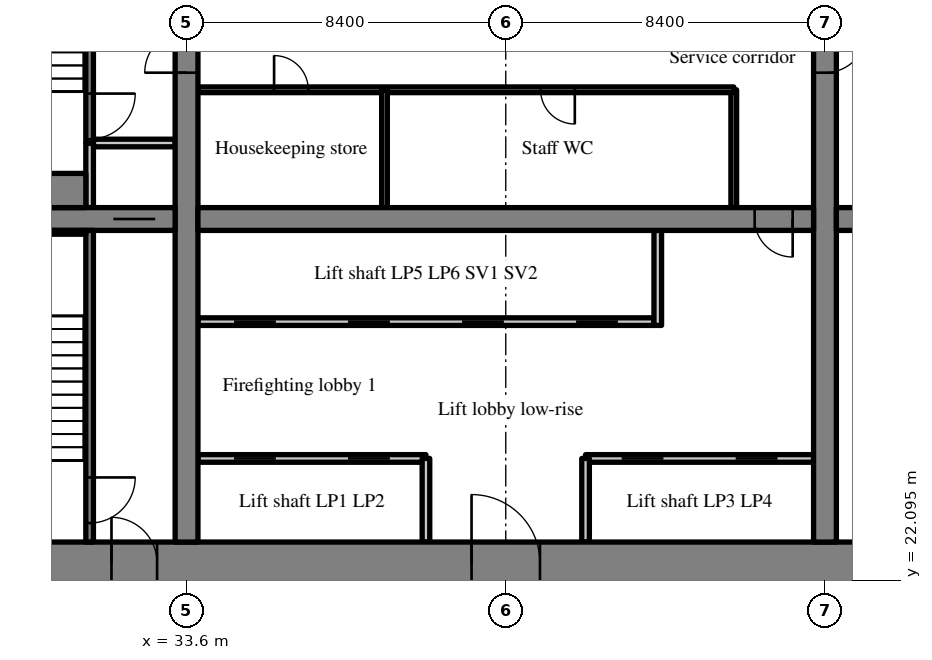
"""IFC4 building model, lengths in metres.
Left out: names, types, materials, properties, quantities, classifications, styles, units other than length and angle.
Written with IfcOpenShell. Run it as: python <this file> out.ifc"""

import sys

from ifc_helpers import new_model, si_unit, direction, frame, frame_2d, origin, place, context, subcontext, project, spatial, rectangle, extrude, source, transform, mapped, element, fill, save


model = new_model("IFC4")
c1 = context("Model", 3, precision=1e-05, world=origin(), true_north=direction((0.0, 1.0)))
c2 = subcontext(c1, "Body", "Model", "MODEL_VIEW")
j1 = project(units=[si_unit("LENGTHUNIT", "METRE"), si_unit("PLANEANGLEUNIT", "RADIAN")], contexts=[c1])
p1 = place(None, origin())
s1 = spatial("IfcSite", under=j1, at=p1, CompositionType="ELEMENT")
p2 = place(p1, origin())
s2 = spatial("IfcBuilding", under=s1, at=p2, CompositionType="ELEMENT")
p3 = place(p2, frame((0.0, 0.0, 11.4)))
s3 = spatial("IfcBuildingStorey", under=s2, at=p3, CompositionType="ELEMENT", Elevation=11.4)
m1 = source(origin(), c2, "Body", "SweptSolid", [
    extrude(rectangle(XDim=50.4, YDim=1.1, at=frame_2d((25.2, 0.0))), origin(), (0.0, 0.0, 1.0), 6.32),
])
p4 = place(p3, frame((25.2, 22.55, 0.0), z_axis=(0.0, 0.0, 1.0), x_axis=(1.0, 0.0, 0.0)))
e1 = element("IfcWall", 1, at=p4, inside=s3, PredefinedType="SHEAR", context=c2, shape_type="MappedRepresentation", body=[
    mapped(m1, transform((0.0, 0.0, 0.0), scale=1.0)),
])
m2 = source(origin(), c2, "Body", "SweptSolid", [
    extrude(rectangle(XDim=1.8, YDim=2.1, at=frame_2d((0.9, 1.05))), frame((0.0, 0.56, 0.0), z_axis=(0.0, -1.0, 0.0), x_axis=(1.0, 0.0, 0.0)), (0.0, 0.0, 1.0), 1.12),
])
p5 = place(p4, frame((15.9, 0.0, 0.0)))
e2 = element("IfcOpeningElement", 2, at=p5, cuts=e1, PredefinedType="OPENING", context=c2, shape_type="MappedRepresentation", body=[
    mapped(m2, transform((0.0, 0.0, 0.0), scale=1.0)),
])
m3 = source(origin(), c2, "Body", "SweptSolid", [
    extrude(rectangle(XDim=1.2, YDim=2.1, at=frame_2d((0.6, 1.05))), frame((0.0, 0.56, 0.0), z_axis=(0.0, -1.0, 0.0), x_axis=(1.0, 0.0, 0.0)), (0.0, 0.0, 1.0), 1.12),
])
p6 = place(p4, frame((27.0, 0.0, 0.0)))
e3 = element("IfcOpeningElement", 3, at=p6, cuts=e1, PredefinedType="OPENING", context=c2, shape_type="MappedRepresentation", body=[
    mapped(m3, transform((0.0, 0.0, 0.0), scale=1.0)),
])
m4 = source(origin(), c2, "Body", "SweptSolid", [
    extrude(rectangle(XDim=0.9, YDim=2.1, at=frame_2d((0.45, 1.05))), frame((0.0, 0.56, 0.0), z_axis=(0.0, -1.0, 0.0), x_axis=(1.0, 0.0, 0.0)), (0.0, 0.0, 1.0), 1.12),
])
p7 = place(p4, frame((34.5, 0.0, 0.0)))
e4 = element("IfcOpeningElement", 4, at=p7, cuts=e1, PredefinedType="OPENING", context=c2, shape_type="MappedRepresentation", body=[
    mapped(m4, transform((0.0, 0.0, 0.0), scale=1.0)),
])
p8 = place(p4, frame((31.5, 0.0, 0.0)))
e5 = element("IfcOpeningElement", 5, at=p8, cuts=e1, PredefinedType="OPENING", context=c2, shape_type="MappedRepresentation", body=[
    mapped(m4, transform((0.0, 0.0, 0.0), scale=1.0)),
])
p9 = place(p4, frame((39.75, 0.0, 0.0)))
e6 = element("IfcOpeningElement", 6, at=p9, cuts=e1, PredefinedType="OPENING", context=c2, shape_type="MappedRepresentation", body=[
    mapped(m4, transform((0.0, 0.0, 0.0), scale=1.0)),
])
p10 = place(p4, frame((36.75, 0.0, 0.0)))
e7 = element("IfcOpeningElement", 7, at=p10, cuts=e1, PredefinedType="OPENING", context=c2, shape_type="MappedRepresentation", body=[
    mapped(m4, transform((0.0, 0.0, 0.0), scale=1.0)),
])
p11 = place(p4, frame((6.425, 0.0, 0.0)))
e8 = element("IfcOpeningElement", 8, at=p11, cuts=e1, PredefinedType="OPENING", context=c2, shape_type="MappedRepresentation", body=[
    mapped(m3, transform((0.0, 0.0, 0.0), scale=1.0)),
])
p12 = place(p4, frame((47.675, 0.0, 0.0)))
e9 = element("IfcOpeningElement", 9, at=p12, cuts=e1, PredefinedType="OPENING", context=c2, shape_type="MappedRepresentation", body=[
    mapped(m3, transform((0.0, 0.0, 0.0), scale=1.0)),
])
m5 = source(origin(), c2, "Body", "SweptSolid", [
    extrude(rectangle(XDim=17.8, YDim=0.6, at=frame_2d((8.9, 0.0))), origin(), (0.0, 0.0, 1.0), 6.32),
])
p13 = place(p3, frame((33.6, 23.1, 0.0), z_axis=(0.0, 0.0, 1.0), x_axis=(0.0, 1.0, 0.0)))
e10 = element("IfcWall", 10, at=p13, inside=s3, PredefinedType="SHEAR", context=c2, shape_type="MappedRepresentation", body=[
    mapped(m5, transform((0.0, 0.0, 0.0), scale=1.0)),
])
m6 = source(origin(), c2, "Body", "SweptSolid", [
    extrude(rectangle(XDim=1.1, YDim=2.1, at=frame_2d((0.55, 1.05))), frame((0.0, 0.31, 0.0), z_axis=(0.0, -1.0, 0.0), x_axis=(1.0, 0.0, 0.0)), (0.0, 0.0, 1.0), 0.62),
])
p14 = place(p13, frame((12.35, 0.0, 0.0)))
e11 = element("IfcOpeningElement", 11, at=p14, cuts=e10, PredefinedType="OPENING", context=c2, shape_type="MappedRepresentation", body=[
    mapped(m6, transform((0.0, 0.0, 0.0), scale=1.0)),
])
p15 = place(p3, frame((50.4, 23.1, 0.0), z_axis=(0.0, 0.0, 1.0), x_axis=(0.0, 1.0, 0.0)))
e12 = element("IfcWall", 12, at=p15, inside=s3, PredefinedType="SHEAR", context=c2, shape_type="MappedRepresentation", body=[
    mapped(m5, transform((0.0, 0.0, 0.0), scale=1.0)),
])
p16 = place(p15, frame((12.35, 0.0, 0.0)))
e13 = element("IfcOpeningElement", 13, at=p16, cuts=e12, PredefinedType="OPENING", context=c2, shape_type="MappedRepresentation", body=[
    mapped(m6, transform((0.0, 0.0, 0.0), scale=1.0)),
])
m7 = source(origin(), c2, "Body", "SweptSolid", [
    extrude(rectangle(XDim=7.0, YDim=0.6, at=frame_2d((3.5, 0.0))), origin(), (0.0, 0.0, 1.0), 6.32),
])
p17 = place(p3, frame((26.3, 31.6, 0.0), z_axis=(0.0, 0.0, 1.0), x_axis=(1.0, 0.0, 0.0)))
e14 = element("IfcWall", 14, at=p17, inside=s3, PredefinedType="SHEAR", context=c2, shape_type="MappedRepresentation", body=[
    mapped(m7, transform((0.0, 0.0, 0.0), scale=1.0)),
])
p18 = place(p17, frame((5.375, 0.0, 0.0)))
e15 = element("IfcOpeningElement", 15, at=p18, cuts=e14, PredefinedType="OPENING", context=c2, shape_type="MappedRepresentation", body=[
    mapped(m6, transform((0.0, 0.0, 0.0), scale=1.0)),
])
m8 = source(origin(), c2, "Body", "SweptSolid", [
    extrude(rectangle(XDim=16.2, YDim=0.6, at=frame_2d((8.1, 0.0))), origin(), (0.0, 0.0, 1.0), 6.32),
])
p19 = place(p3, frame((33.9, 31.6, 0.0), z_axis=(0.0, 0.0, 1.0), x_axis=(1.0, 0.0, 0.0)))
e16 = element("IfcWall", 16, at=p19, inside=s3, PredefinedType="SHEAR", context=c2, shape_type="MappedRepresentation", body=[
    mapped(m8, transform((0.0, 0.0, 0.0), scale=1.0)),
])
m9 = source(origin(), c2, "Body", "SweptSolid", [
    extrude(rectangle(XDim=1.0, YDim=2.1, at=frame_2d((0.5, 1.05))), frame((0.0, 0.31, 0.0), z_axis=(0.0, -1.0, 0.0), x_axis=(1.0, 0.0, 0.0)), (0.0, 0.0, 1.0), 0.62),
])
p20 = place(p19, frame((14.65, 0.0, 0.0)))
e17 = element("IfcOpeningElement", 17, at=p20, cuts=e16, PredefinedType="OPENING", context=c2, shape_type="MappedRepresentation", body=[
    mapped(m9, transform((0.0, 0.0, 0.0), scale=1.0)),
])
m10 = source(origin(), c2, "Body", "SweptSolid", [
    extrude(rectangle(XDim=16.2, YDim=0.6, at=frame_2d((8.1, 0.0))), origin(), (0.0, 0.0, 1.0), 6.32),
])
p21 = place(p3, frame((50.7, 31.6, 0.0), z_axis=(0.0, 0.0, 1.0), x_axis=(1.0, 0.0, 0.0)))
e18 = element("IfcWall", 18, at=p21, inside=s3, PredefinedType="SHEAR", context=c2, shape_type="MappedRepresentation", body=[
    mapped(m10, transform((0.0, 0.0, 0.0), scale=1.0)),
])
p22 = place(p21, frame((0.55, 0.0, 0.0)))
e19 = element("IfcOpeningElement", 19, at=p22, cuts=e18, PredefinedType="OPENING", context=c2, shape_type="MappedRepresentation", body=[
    mapped(m9, transform((0.0, 0.0, 0.0), scale=1.0)),
])
m11 = source(origin(), c2, "Body", "SweptSolid", [
    extrude(rectangle(XDim=6.0, YDim=0.2, at=frame_2d((3.0, 0.0))), origin(), (0.0, 0.0, 1.0), 6.32),
])
p23 = place(p3, frame((33.9, 25.3, 0.0), z_axis=(0.0, 0.0, 1.0), x_axis=(1.0, 0.0, 0.0)))
e20 = element("IfcWall", 20, at=p23, inside=s3, PredefinedType="SOLIDWALL", context=c2, shape_type="MappedRepresentation", body=[
    mapped(m11, transform((0.0, 0.0, 0.0), scale=1.0)),
])
m12 = source(origin(), c2, "Body", "SweptSolid", [
    extrude(rectangle(XDim=1.1, YDim=2.1, at=frame_2d((0.55, 1.05))), frame((0.0, 0.11, 0.0), z_axis=(0.0, -1.0, 0.0), x_axis=(1.0, 0.0, 0.0)), (0.0, 0.0, 1.0), 0.22),
])
p24 = place(p23, frame((0.95, 0.0, 0.0)))
e21 = element("IfcOpeningElement", 21, at=p24, cuts=e20, PredefinedType="OPENING", context=c2, shape_type="MappedRepresentation", body=[
    mapped(m12, transform((0.0, 0.0, 0.0), scale=1.0)),
])
p25 = place(p23, frame((3.95, 0.0, 0.0)))
e22 = element("IfcOpeningElement", 22, at=p25, cuts=e20, PredefinedType="OPENING", context=c2, shape_type="MappedRepresentation", body=[
    mapped(m12, transform((0.0, 0.0, 0.0), scale=1.0)),
])
p26 = place(p3, frame((44.1, 25.3, 0.0), z_axis=(0.0, 0.0, 1.0), x_axis=(1.0, 0.0, 0.0)))
e23 = element("IfcWall", 23, at=p26, inside=s3, PredefinedType="SOLIDWALL", context=c2, shape_type="MappedRepresentation", body=[
    mapped(m11, transform((0.0, 0.0, 0.0), scale=1.0)),
])
p27 = place(p26, frame((0.95, 0.0, 0.0)))
e24 = element("IfcOpeningElement", 24, at=p27, cuts=e23, PredefinedType="OPENING", context=c2, shape_type="MappedRepresentation", body=[
    mapped(m12, transform((0.0, 0.0, 0.0), scale=1.0)),
])
p28 = place(p26, frame((3.95, 0.0, 0.0)))
e25 = element("IfcOpeningElement", 25, at=p28, cuts=e23, PredefinedType="OPENING", context=c2, shape_type="MappedRepresentation", body=[
    mapped(m12, transform((0.0, 0.0, 0.0), scale=1.0)),
])
m13 = source(origin(), c2, "Body", "SweptSolid", [
    extrude(rectangle(XDim=12.0, YDim=0.2, at=frame_2d((6.0, 0.0))), origin(), (0.0, 0.0, 1.0), 6.32),
])
p29 = place(p3, frame((33.9, 28.9, 0.0), z_axis=(0.0, 0.0, 1.0), x_axis=(1.0, 0.0, 0.0)))
e26 = element("IfcWall", 26, at=p29, inside=s3, PredefinedType="SOLIDWALL", context=c2, shape_type="MappedRepresentation", body=[
    mapped(m13, transform((0.0, 0.0, 0.0), scale=1.0)),
])
p30 = place(p29, frame((0.95, 0.0, 0.0)))
e27 = element("IfcOpeningElement", 27, at=p30, cuts=e26, PredefinedType="OPENING", context=c2, shape_type="MappedRepresentation", body=[
    mapped(m12, transform((0.0, 0.0, 0.0), scale=1.0)),
])
p31 = place(p29, frame((3.95, 0.0, 0.0)))
e28 = element("IfcOpeningElement", 28, at=p31, cuts=e26, PredefinedType="OPENING", context=c2, shape_type="MappedRepresentation", body=[
    mapped(m12, transform((0.0, 0.0, 0.0), scale=1.0)),
])
p32 = place(p29, frame((6.95, 0.0, 0.0)))
e29 = element("IfcOpeningElement", 29, at=p32, cuts=e26, PredefinedType="OPENING", context=c2, shape_type="MappedRepresentation", body=[
    mapped(m12, transform((0.0, 0.0, 0.0), scale=1.0)),
])
p33 = place(p29, frame((9.95, 0.0, 0.0)))
e30 = element("IfcOpeningElement", 30, at=p33, cuts=e26, PredefinedType="OPENING", context=c2, shape_type="MappedRepresentation", body=[
    mapped(m12, transform((0.0, 0.0, 0.0), scale=1.0)),
])
m14 = source(origin(), c2, "Body", "SweptSolid", [
    extrude(rectangle(XDim=2.2, YDim=0.2, at=frame_2d((1.1, 0.0))), origin(), (0.0, 0.0, 1.0), 6.32),
])
for number, where, z_axis, x_axis in (
    (31, (39.9, 23.1, 0.0), (0.0, 0.0, 1.0), (0.0, 1.0, 0.0)),
    (32, (44.1, 23.1, 0.0), (0.0, 0.0, 1.0), (0.0, 1.0, 0.0)),
):
    element("IfcWall", number, at=place(p3, frame(where, z_axis=z_axis, x_axis=x_axis)), inside=s3, PredefinedType="SOLIDWALL", context=c2, shape_type="MappedRepresentation", body=[
        mapped(m14, transform((0.0, 0.0, 0.0), scale=1.0)),
    ])
m15 = source(origin(), c2, "Body", "SweptSolid", [
    extrude(rectangle(XDim=2.5, YDim=0.2, at=frame_2d((1.25, 0.0))), origin(), (0.0, 0.0, 1.0), 6.32),
])
p34 = place(p3, frame((46.0, 28.8, 0.0), z_axis=(0.0, 0.0, 1.0), x_axis=(0.0, 1.0, 0.0)))
e33 = element("IfcWall", 33, at=p34, inside=s3, PredefinedType="SOLIDWALL", context=c2, shape_type="MappedRepresentation", body=[
    mapped(m15, transform((0.0, 0.0, 0.0), scale=1.0)),
])
m16 = source(origin(), c2, "Body", "SweptSolid", [
    extrude(rectangle(XDim=3.1, YDim=0.15, at=frame_2d((1.55, 0.0))), origin(), (0.0, 0.0, 1.0), 6.32),
])
p35 = place(p3, frame((48.0, 31.9, 0.0), z_axis=(0.0, 0.0, 1.0), x_axis=(0.0, 1.0, 0.0)))
e34 = element("IfcWall", 34, at=p35, inside=s3, PredefinedType="PARTITIONING", context=c2, shape_type="MappedRepresentation", body=[
    mapped(m16, transform((0.0, 0.0, 0.0), scale=1.0)),
])
m17 = source(origin(), c2, "Body", "SweptSolid", [
    extrude(rectangle(XDim=14.1, YDim=0.15, at=frame_2d((7.05, 0.0))), origin(), (0.0, 0.0, 1.0), 6.32),
])
p36 = place(p3, frame((33.9, 35.0, 0.0), z_axis=(0.0, 0.0, 1.0), x_axis=(1.0, 0.0, 0.0)))
e35 = element("IfcWall", 35, at=p36, inside=s3, PredefinedType="PARTITIONING", context=c2, shape_type="MappedRepresentation", body=[
    mapped(m17, transform((0.0, 0.0, 0.0), scale=1.0)),
])
m18 = source(origin(), c2, "Body", "SweptSolid", [
    extrude(rectangle(XDim=0.9, YDim=2.1, at=frame_2d((0.45, 1.05))), frame((0.0, 0.085, 0.0), z_axis=(0.0, -1.0, 0.0), x_axis=(1.0, 0.0, 0.0)), (0.0, 0.0, 1.0), 0.17),
])
p37 = place(p36, frame((2.004, 0.0, 0.0)))
e36 = element("IfcOpeningElement", 36, at=p37, cuts=e35, PredefinedType="OPENING", context=c2, shape_type="MappedRepresentation", body=[
    mapped(m18, transform((0.0, 0.0, 0.0), scale=1.0)),
])
p38 = place(p36, frame((9.017, 0.0, 0.0)))
e37 = element("IfcOpeningElement", 37, at=p38, cuts=e35, PredefinedType="OPENING", context=c2, shape_type="MappedRepresentation", body=[
    mapped(m18, transform((0.0, 0.0, 0.0), scale=1.0)),
])
p39 = place(p3, frame((38.809, 31.9, 0.0), z_axis=(0.0, 0.0, 1.0), x_axis=(0.0, 1.0, 0.0)))
e38 = element("IfcWall", 38, at=p39, inside=s3, PredefinedType="PARTITIONING", context=c2, shape_type="MappedRepresentation", body=[
    mapped(m16, transform((0.0, 0.0, 0.0), scale=1.0)),
])
m19 = source(origin(), c2, "Body", "SweptSolid", [
    extrude(rectangle(XDim=8.2, YDim=0.2, at=frame_2d((4.1, 0.0))), origin(), (0.0, 0.0, 1.0), 6.32),
])
p40 = place(p3, frame((31.05, 23.1, 0.0), z_axis=(0.0, 0.0, 1.0), x_axis=(0.0, 1.0, 0.0)))
e39 = element("IfcWall", 39, at=p40, inside=s3, PredefinedType="SOLIDWALL", context=c2, shape_type="MappedRepresentation", body=[
    mapped(m19, transform((0.0, 0.0, 0.0), scale=1.0)),
])
m20 = source(origin(), c2, "Body", "SweptSolid", [
    extrude(rectangle(XDim=1.2, YDim=2.1, at=frame_2d((0.6, 1.05))), frame((0.0, 0.11, 0.0), z_axis=(0.0, -1.0, 0.0), x_axis=(1.0, 0.0, 0.0)), (0.0, 0.0, 1.0), 0.22),
])
p41 = place(p40, frame((0.5, 0.0, 0.0)))
e40 = element("IfcOpeningElement", 40, at=p41, cuts=e39, PredefinedType="OPENING", context=c2, shape_type="MappedRepresentation", body=[
    mapped(m20, transform((0.0, 0.0, 0.0), scale=1.0)),
])
m21 = source(origin(), c2, "Body", "SweptSolid", [
    extrude(rectangle(XDim=1.7, YDim=0.2, at=frame_2d((0.85, 0.0))), origin(), (0.0, 0.0, 1.0), 6.32),
])
p42 = place(p3, frame((31.05, 31.9, 0.0), z_axis=(0.0, 0.0, 1.0), x_axis=(0.0, 1.0, 0.0)))
e41 = element("IfcWall", 41, at=p42, inside=s3, PredefinedType="SOLIDWALL", context=c2, shape_type="MappedRepresentation", body=[
    mapped(m21, transform((0.0, 0.0, 0.0), scale=1.0)),
])
m22 = source(origin(), c2, "Body", "SweptSolid", [
    extrude(rectangle(XDim=2.15, YDim=0.2, at=frame_2d((1.075, 0.0))), origin(), (0.0, 0.0, 1.0), 6.32),
])
p43 = place(p3, frame((31.15, 33.6, 0.0), z_axis=(0.0, 0.0, 1.0), x_axis=(1.0, 0.0, 0.0)))
e42 = element("IfcWall", 42, at=p43, inside=s3, PredefinedType="SOLIDWALL", context=c2, shape_type="MappedRepresentation", body=[
    mapped(m22, transform((0.0, 0.0, 0.0), scale=1.0)),
])
m23 = source(origin(), c2, "Body", "SweptSolid", [
    extrude(rectangle(XDim=7.3, YDim=0.2, at=frame_2d((3.65, 0.0))), origin(), (0.0, 0.0, 1.0), 6.32),
])
p44 = place(p3, frame((31.05, 33.6, 0.0), z_axis=(0.0, 0.0, 1.0), x_axis=(0.0, 1.0, 0.0)))
e43 = element("IfcWall", 43, at=p44, inside=s3, PredefinedType="SOLIDWALL", context=c2, shape_type="MappedRepresentation", body=[
    mapped(m23, transform((0.0, 0.0, 0.0), scale=1.0)),
])
p45 = place(p44, frame((0.1, 0.0, 0.0)))
e44 = element("IfcOpeningElement", 44, at=p45, cuts=e43, PredefinedType="OPENING", context=c2, shape_type="MappedRepresentation", body=[
    mapped(m20, transform((0.0, 0.0, 0.0), scale=1.0)),
])
m24 = source(origin(), c2, "Body", "SweptSolid", [
    extrude(rectangle(XDim=4.65, YDim=0.1, at=frame_2d((2.325, 0.0))), origin(), (0.0, 0.0, 1.0), 6.32),
])
p46 = place(p3, frame((26.3, 31.25, 0.0), z_axis=(0.0, 0.0, 1.0), x_axis=(1.0, 0.0, 0.0)))
e45 = element("IfcWall", 45, at=p46, inside=s3, PredefinedType="SOLIDWALL", context=c2, shape_type="MappedRepresentation", body=[
    mapped(m24, transform((0.0, 0.0, 0.0), scale=1.0)),
])
m25 = source(origin(), c2, "Body", "SweptSolid", [
    extrude(rectangle(XDim=4.65, YDim=0.9, at=frame_2d((2.325, 0.0))), origin(), (0.0, 0.0, 1.0), 6.32),
])
p47 = place(p3, frame((26.3, 32.35, 0.0), z_axis=(0.0, 0.0, 1.0), x_axis=(1.0, 0.0, 0.0)))
e46 = element("IfcWall", 46, at=p47, inside=s3, PredefinedType="SOLIDWALL", context=c2, shape_type="MappedRepresentation", body=[
    mapped(m25, transform((0.0, 0.0, 0.0), scale=1.0)),
])
m26 = source(origin(), c2, "Body", "SweptSolid", [
    extrude(rectangle(XDim=1.8, YDim=2.1, at=frame_2d((0.9, 1.05))), frame((0.0, 0.325, 0.0), z_axis=(0.0, -1.0, 0.0), x_axis=(1.0, 0.0, 0.0)), (0.0, 0.0, 1.0), 0.05),
])
p48 = place(p5, origin())
e47 = element("IfcDoor", 47, at=p48, inside=s3, OperationType="DOUBLE_DOOR_SINGLE_SWING", PredefinedType="DOOR", context=c2, shape_type="MappedRepresentation", body=[
    mapped(m26, transform((0.0, 0.0, 0.0), scale=1.0)),
])
fill(e2, e47)
m27 = source(origin(), c2, "Body", "SweptSolid", [
    extrude(rectangle(XDim=1.0, YDim=2.1, at=frame_2d((0.5, 1.05))), frame((0.0, 0.025, 0.0), z_axis=(0.0, -1.0, 0.0), x_axis=(1.0, 0.0, 0.0)), (0.0, 0.0, 1.0), 0.05),
])
p49 = place(p20, origin())
e48 = element("IfcDoor", 48, at=p49, inside=s3, OperationType="SINGLE_SWING_RIGHT", PredefinedType="DOOR", context=c2, shape_type="MappedRepresentation", body=[
    mapped(m27, transform((0.0, 0.0, 0.0), scale=1.0)),
])
fill(e17, e48)
m28 = source(origin(), c2, "Body", "SweptSolid", [
    extrude(rectangle(XDim=1.1, YDim=2.1, at=frame_2d((0.55, 1.05))), frame((0.0, 0.025, 0.0), z_axis=(0.0, -1.0, 0.0), x_axis=(1.0, 0.0, 0.0)), (0.0, 0.0, 1.0), 0.05),
])
p50 = place(p24, origin())
e49 = element("IfcDoor", 49, at=p50, inside=s3, OperationType="SLIDING_TO_LEFT", PredefinedType="DOOR", context=c2, shape_type="MappedRepresentation", body=[
    mapped(m28, transform((0.0, 0.0, 0.0), scale=1.0)),
])
fill(e21, e49)
p51 = place(p25, origin())
e50 = element("IfcDoor", 50, at=p51, inside=s3, OperationType="SLIDING_TO_RIGHT", PredefinedType="DOOR", context=c2, shape_type="MappedRepresentation", body=[
    mapped(m28, transform((0.0, 0.0, 0.0), scale=1.0)),
])
fill(e22, e50)
p52 = place(p27, origin())
e51 = element("IfcDoor", 51, at=p52, inside=s3, OperationType="SLIDING_TO_LEFT", PredefinedType="DOOR", context=c2, shape_type="MappedRepresentation", body=[
    mapped(m28, transform((0.0, 0.0, 0.0), scale=1.0)),
])
fill(e24, e51)
p53 = place(p28, origin())
e52 = element("IfcDoor", 52, at=p53, inside=s3, OperationType="SLIDING_TO_RIGHT", PredefinedType="DOOR", context=c2, shape_type="MappedRepresentation", body=[
    mapped(m28, transform((0.0, 0.0, 0.0), scale=1.0)),
])
fill(e25, e52)
p54 = place(p30, origin())
e53 = element("IfcDoor", 53, at=p54, inside=s3, OperationType="SLIDING_TO_LEFT", PredefinedType="DOOR", context=c2, shape_type="MappedRepresentation", body=[
    mapped(m28, transform((0.0, 0.0, 0.0), scale=1.0)),
])
fill(e27, e53)
p55 = place(p31, origin())
e54 = element("IfcDoor", 54, at=p55, inside=s3, OperationType="SLIDING_TO_RIGHT", PredefinedType="DOOR", context=c2, shape_type="MappedRepresentation", body=[
    mapped(m28, transform((0.0, 0.0, 0.0), scale=1.0)),
])
fill(e28, e54)
p56 = place(p32, origin())
e55 = element("IfcDoor", 55, at=p56, inside=s3, OperationType="SLIDING_TO_LEFT", PredefinedType="DOOR", context=c2, shape_type="MappedRepresentation", body=[
    mapped(m28, transform((0.0, 0.0, 0.0), scale=1.0)),
])
fill(e29, e55)
p57 = place(p33, origin())
e56 = element("IfcDoor", 56, at=p57, inside=s3, OperationType="SLIDING_TO_RIGHT", PredefinedType="DOOR", context=c2, shape_type="MappedRepresentation", body=[
    mapped(m28, transform((0.0, 0.0, 0.0), scale=1.0)),
])
fill(e30, e56)
m29 = source(origin(), c2, "Body", "SweptSolid", [
    extrude(rectangle(XDim=0.9, YDim=2.1, at=frame_2d((0.45, 1.05))), frame((0.0, 0.025, 0.0), z_axis=(0.0, -1.0, 0.0), x_axis=(1.0, 0.0, 0.0)), (0.0, 0.0, 1.0), 0.05),
])
p58 = place(p37, origin())
e57 = element("IfcDoor", 57, at=p58, inside=s3, OperationType="SINGLE_SWING_LEFT", PredefinedType="DOOR", context=c2, shape_type="MappedRepresentation", body=[
    mapped(m29, transform((0.0, 0.0, 0.0), scale=1.0)),
])
fill(e36, e57)
p59 = place(p38, origin())
e58 = element("IfcDoor", 58, at=p59, inside=s3, OperationType="SINGLE_SWING_RIGHT", PredefinedType="DOOR", context=c2, shape_type="MappedRepresentation", body=[
    mapped(m29, transform((0.0, 0.0, 0.0), scale=1.0)),
])
fill(e37, e58)
m30 = source(origin(), c2, "Body", "SweptSolid", [
    extrude(rectangle(XDim=1.2, YDim=2.1, at=frame_2d((0.6, 1.05))), frame((0.0, 0.025, 0.0), z_axis=(0.0, -1.0, 0.0), x_axis=(1.0, 0.0, 0.0)), (0.0, 0.0, 1.0), 0.05),
])
p60 = place(p41, origin())
e59 = element("IfcDoor", 59, at=p60, inside=s3, OperationType="SINGLE_SWING_RIGHT", PredefinedType="DOOR", context=c2, shape_type="MappedRepresentation", body=[
    mapped(m30, transform((0.0, 0.0, 0.0), scale=1.0)),
])
fill(e40, e59)
m31 = source(origin(), c2, "Body", "SweptSolid", [
    extrude(rectangle(XDim=1.2, YDim=2.1, at=frame_2d((0.6, 1.05))), frame((0.0, 0.325, 0.0), z_axis=(0.0, -1.0, 0.0), x_axis=(1.0, 0.0, 0.0)), (0.0, 0.0, 1.0), 0.05),
])
p61 = place(p11, origin())
e60 = element("IfcDoor", 60, at=p61, inside=s3, OperationType="SINGLE_SWING_LEFT", PredefinedType="DOOR", context=c2, shape_type="MappedRepresentation", body=[
    mapped(m31, transform((0.0, 0.0, 0.0), scale=1.0)),
])
fill(e8, e60)
p62 = place(p18, origin())
e61 = element("IfcDoor", 61, at=p62, inside=s3, OperationType="SLIDING_TO_RIGHT", PredefinedType="DOOR", context=c2, shape_type="MappedRepresentation", body=[
    mapped(m28, transform((0.0, 0.0, 0.0), scale=1.0)),
])
fill(e15, e61)
p63 = place(p45, origin())
e62 = element("IfcDoor", 62, at=p63, inside=s3, OperationType="SINGLE_SWING_RIGHT", PredefinedType="DOOR", context=c2, shape_type="MappedRepresentation", body=[
    mapped(m30, transform((0.0, 0.0, 0.0), scale=1.0)),
])
fill(e44, e62)
p64 = place(p14, origin())
e63 = element("IfcDoor", 63, at=p64, inside=s3, OperationType="SINGLE_SWING_LEFT", PredefinedType="DOOR", context=c2, shape_type="MappedRepresentation", body=[
    mapped(m28, transform((0.0, 0.0, 0.0), scale=1.0)),
])
fill(e11, e63)
p65 = place(p16, origin())
e64 = element("IfcDoor", 64, at=p65, inside=s3, OperationType="SINGLE_SWING_RIGHT", PredefinedType="DOOR", context=c2, shape_type="MappedRepresentation", body=[
    mapped(m28, transform((0.0, 0.0, 0.0), scale=1.0)),
])
fill(e13, e64)
save(model, sys.argv[1])
